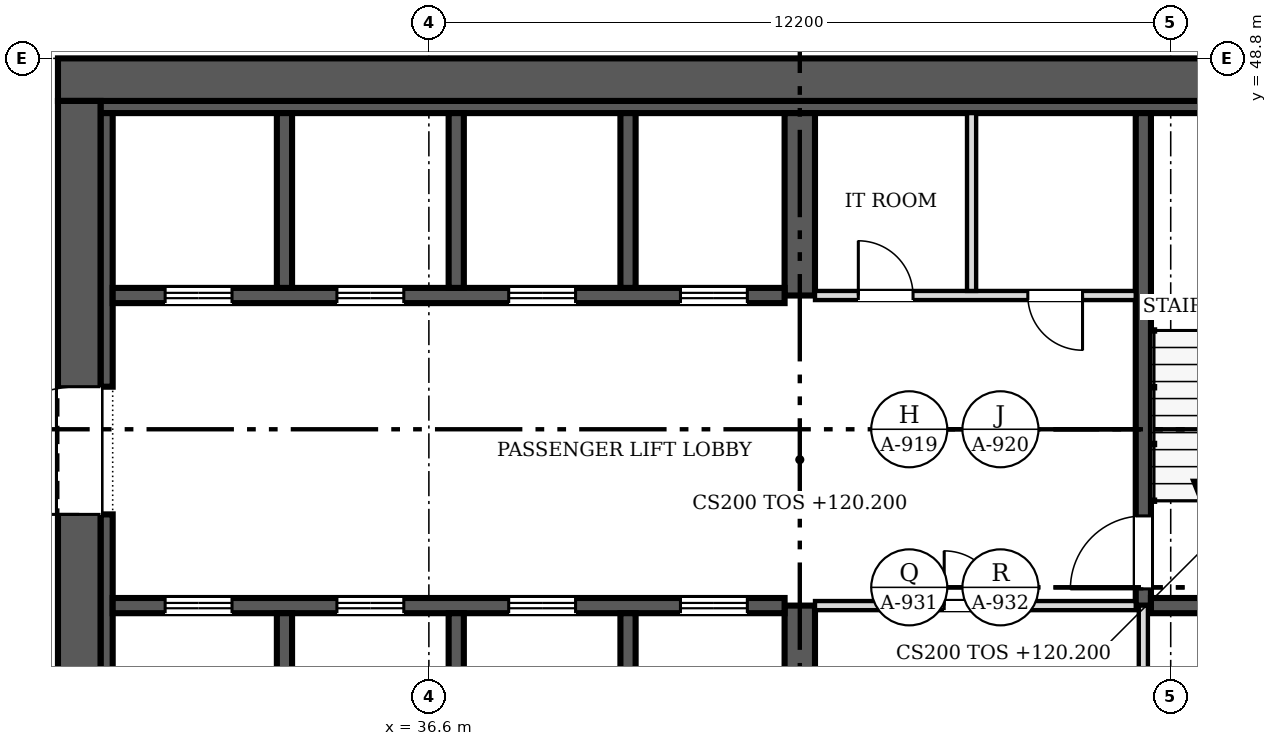
"""IFC4 building model, lengths in metres.
Left out: names, types, materials, properties, quantities, classifications, styles, units other than length and angle.
Written with IfcOpenShell. Run it as: python <this file> out.ifc"""

import sys

from ifc_helpers import new_model, si_unit, direction, frame, frame_2d, origin, place, context, subcontext, project, spatial, rectangle, extrude, source, transform, mapped, element, fill, save


model = new_model("IFC4")
c1 = context("Model", 3, precision=1e-05, world=origin(), true_north=direction((0.0, 1.0)))
c2 = subcontext(c1, "Body", "Model", "MODEL_VIEW")
j1 = project(units=[si_unit("LENGTHUNIT", "METRE"), si_unit("PLANEANGLEUNIT", "RADIAN")], contexts=[c1])
p1 = place(None, origin())
s1 = spatial("IfcSite", under=j1, at=p1, CompositionType="ELEMENT")
p2 = place(p1, origin())
s2 = spatial("IfcBuilding", under=s1, at=p2, CompositionType="ELEMENT")
p3 = place(p2, frame((0.0, 0.0, 120.2)))
s3 = spatial("IfcBuildingStorey", under=s2, at=p3, CompositionType="ELEMENT", Elevation=120.2)
p4 = place(p3, frame((30.85, 25.1, 0.0), z_axis=(0.0, 0.0, 1.0), x_axis=(0.0, 1.0, 0.0)))
e1 = element("IfcWall", 1, at=p4, inside=s3, PredefinedType="SHEAR", context=c2, shape_type="SweptSolid", body=[
    extrude(rectangle(XDim=23.0, YDim=0.7, at=frame_2d((11.5, 0.0))), origin(), (0.0, 0.0, 1.0), 3.8),
])
m1 = source(origin(), c2, "Body", "SweptSolid", [
    extrude(rectangle(XDim=2.1, YDim=2.4, at=frame_2d((1.05, 1.2))), frame((0.0, 0.36, 0.0), z_axis=(0.0, -1.0, 0.0), x_axis=(1.0, 0.0, 0.0)), (0.0, 0.0, 1.0), 0.72),
])
p5 = place(p4, frame((4.7, 0.0, 0.0)))
e2 = element("IfcOpeningElement", 2, at=p5, cuts=e1, PredefinedType="OPENING", context=c2, shape_type="MappedRepresentation", body=[
    mapped(m1, transform((0.0, 0.0, 0.0), scale=1.0)),
])
p6 = place(p4, frame((16.2, 0.0, 0.0)))
e3 = element("IfcOpeningElement", 3, at=p6, cuts=e1, PredefinedType="OPENING", context=c2, shape_type="MappedRepresentation", body=[
    mapped(m1, transform((0.0, 0.0, 0.0), scale=1.0)),
])
p7 = place(p3, frame((30.5, 48.45, 0.0), z_axis=(0.0, 0.0, 1.0), x_axis=(1.0, 0.0, 0.0)))
e4 = element("IfcWall", 4, at=p7, inside=s3, PredefinedType="SHEAR", context=c2, shape_type="SweptSolid", body=[
    extrude(rectangle(XDim=24.4, YDim=0.7, at=frame_2d((12.2, 0.0))), origin(), (0.0, 0.0, 1.0), 3.8),
])
p8 = place(p3, frame((31.2, 48.0, 0.0), z_axis=(0.0, 0.0, 1.0), x_axis=(1.0, 0.0, 0.0)))
e5 = element("IfcWall", 5, at=p8, inside=s3, PredefinedType="SOLIDWALL", context=c2, shape_type="SweptSolid", body=[
    extrude(rectangle(XDim=23.0, YDim=0.2, at=frame_2d((11.5, 0.0))), origin(), (0.0, 0.0, 1.0), 3.8),
])
p9 = place(p3, frame((31.3, 31.9, 0.0), z_axis=(0.0, 0.0, 1.0), x_axis=(0.0, 1.0, 0.0)))
e6 = element("IfcWall", 6, at=p9, inside=s3, PredefinedType="SOLIDWALL", context=c2, shape_type="SweptSolid", body=[
    extrude(rectangle(XDim=9.4, YDim=0.2, at=frame_2d((4.7, 0.0))), origin(), (0.0, 0.0, 1.0), 3.8),
])
p10 = place(p3, frame((31.3, 43.4, 0.0), z_axis=(0.0, 0.0, 1.0), x_axis=(0.0, 1.0, 0.0)))
e7 = element("IfcWall", 7, at=p10, inside=s3, PredefinedType="SOLIDWALL", context=c2, shape_type="SweptSolid", body=[
    extrude(rectangle(XDim=4.5, YDim=0.2, at=frame_2d((2.25, 0.0))), origin(), (0.0, 0.0, 1.0), 3.8),
])
p11 = place(p3, frame((42.7, 36.85, 0.0), z_axis=(0.0, 0.0, 1.0), x_axis=(0.0, 1.0, 0.0)))
e8 = element("IfcWall", 8, at=p11, inside=s3, PredefinedType="SHEAR", context=c2, shape_type="SweptSolid", body=[
    extrude(rectangle(XDim=2.95, YDim=0.5, at=frame_2d((1.475, 0.0))), origin(), (0.0, 0.0, 1.0), 3.8),
])
p12 = place(p3, frame((42.7, 44.9, 0.0), z_axis=(0.0, 0.0, 1.0), x_axis=(0.0, 1.0, 0.0)))
e9 = element("IfcWall", 9, at=p12, inside=s3, PredefinedType="SHEAR", context=c2, shape_type="SweptSolid", body=[
    extrude(rectangle(XDim=3.0, YDim=0.5, at=frame_2d((1.5, 0.0))), origin(), (0.0, 0.0, 1.0), 3.8),
])
p13 = place(p3, frame((31.4, 39.8, 0.0), z_axis=(0.0, 0.0, 1.0), x_axis=(1.0, 0.0, 0.0)))
e10 = element("IfcWall", 10, at=p13, inside=s3, PredefinedType="SOLIDWALL", context=c2, shape_type="SweptSolid", body=[
    extrude(rectangle(XDim=11.05, YDim=0.25, at=frame_2d((5.525, 0.0))), origin(), (0.0, 0.0, 1.0), 3.8),
])
m2 = source(origin(), c2, "Body", "SweptSolid", [
    extrude(rectangle(XDim=1.1, YDim=2.1, at=frame_2d((0.55, 1.05))), frame((0.0, 0.135, 0.0), z_axis=(0.0, -1.0, 0.0), x_axis=(1.0, 0.0, 0.0)), (0.0, 0.0, 1.0), 0.27),
])
p14 = place(p13, frame((0.863, 0.0, 0.0)))
e11 = element("IfcOpeningElement", 11, at=p14, cuts=e10, PredefinedType="OPENING", context=c2, shape_type="MappedRepresentation", body=[
    mapped(m2, transform((0.0, 0.0, 0.0), scale=1.0)),
])
p15 = place(p13, frame((3.688, 0.0, 0.0)))
e12 = element("IfcOpeningElement", 12, at=p15, cuts=e10, PredefinedType="OPENING", context=c2, shape_type="MappedRepresentation", body=[
    mapped(m2, transform((0.0, 0.0, 0.0), scale=1.0)),
])
p16 = place(p13, frame((6.512, 0.0, 0.0)))
e13 = element("IfcOpeningElement", 13, at=p16, cuts=e10, PredefinedType="OPENING", context=c2, shape_type="MappedRepresentation", body=[
    mapped(m2, transform((0.0, 0.0, 0.0), scale=1.0)),
])
p17 = place(p13, frame((9.337, 0.0, 0.0)))
e14 = element("IfcOpeningElement", 14, at=p17, cuts=e10, PredefinedType="OPENING", context=c2, shape_type="MappedRepresentation", body=[
    mapped(m2, transform((0.0, 0.0, 0.0), scale=1.0)),
])
p18 = place(p3, frame((42.45, 44.9, 0.0), z_axis=(0.0, 0.0, 1.0), x_axis=(-1.0, 0.0, 0.0)))
e15 = element("IfcWall", 15, at=p18, inside=s3, PredefinedType="SOLIDWALL", context=c2, shape_type="SweptSolid", body=[
    extrude(rectangle(XDim=11.05, YDim=0.25, at=frame_2d((5.525, 0.0))), origin(), (0.0, 0.0, 1.0), 3.8),
])
p19 = place(p18, frame((9.087, 0.0, 0.0)))
e16 = element("IfcOpeningElement", 16, at=p19, cuts=e15, PredefinedType="OPENING", context=c2, shape_type="MappedRepresentation", body=[
    mapped(m2, transform((0.0, 0.0, 0.0), scale=1.0)),
])
p20 = place(p18, frame((6.262, 0.0, 0.0)))
e17 = element("IfcOpeningElement", 17, at=p20, cuts=e15, PredefinedType="OPENING", context=c2, shape_type="MappedRepresentation", body=[
    mapped(m2, transform((0.0, 0.0, 0.0), scale=1.0)),
])
p21 = place(p18, frame((3.438, 0.0, 0.0)))
e18 = element("IfcOpeningElement", 18, at=p21, cuts=e15, PredefinedType="OPENING", context=c2, shape_type="MappedRepresentation", body=[
    mapped(m2, transform((0.0, 0.0, 0.0), scale=1.0)),
])
p22 = place(p18, frame((0.613, 0.0, 0.0)))
e19 = element("IfcOpeningElement", 19, at=p22, cuts=e15, PredefinedType="OPENING", context=c2, shape_type="MappedRepresentation", body=[
    mapped(m2, transform((0.0, 0.0, 0.0), scale=1.0)),
])
p23 = place(p3, frame((48.35, 47.9, 0.0), z_axis=(0.0, 0.0, 1.0), x_axis=(0.0, -1.0, 0.0)))
e20 = element("IfcWall", 20, at=p23, inside=s3, PredefinedType="SOLIDWALL", context=c2, shape_type="SweptSolid", body=[
    extrude(rectangle(XDim=8.1, YDim=0.25, at=frame_2d((4.05, 0.0))), origin(), (0.0, 0.0, 1.0), 3.8),
])
m3 = source(origin(), c2, "Body", "SweptSolid", [
    extrude(rectangle(XDim=1.2, YDim=2.1, at=frame_2d((0.6, 1.05))), frame((0.0, 0.135, 0.0), z_axis=(0.0, -1.0, 0.0), x_axis=(1.0, 0.0, 0.0)), (0.0, 0.0, 1.0), 0.27),
])
p24 = place(p23, frame((6.625, 0.0, 0.0)))
e21 = element("IfcOpeningElement", 21, at=p24, cuts=e20, PredefinedType="OPENING", context=c2, shape_type="MappedRepresentation", body=[
    mapped(m3, transform((0.0, 0.0, 0.0), scale=1.0)),
])
p25 = place(p3, frame((48.475, 39.8, 0.0), z_axis=(0.0, 0.0, 1.0), x_axis=(1.0, 0.0, 0.0)))
e22 = element("IfcWall", 22, at=p25, inside=s3, PredefinedType="SOLIDWALL", context=c2, shape_type="SweptSolid", body=[
    extrude(rectangle(XDim=3.4, YDim=0.25, at=frame_2d((1.7, 0.0))), origin(), (0.0, 0.0, 1.0), 3.8),
])
for number, where, z_axis, x_axis in (
    (23, (34.225, 36.85, 0.0), (0.0, 0.0, 1.0), (0.0, 1.0, 0.0)),
    (24, (37.05, 36.85, 0.0), (0.0, 0.0, 1.0), (0.0, 1.0, 0.0)),
    (25, (39.875, 36.85, 0.0), (0.0, 0.0, 1.0), (0.0, 1.0, 0.0)),
):
    element("IfcWall", number, at=place(p3, frame(where, z_axis=z_axis, x_axis=x_axis)), inside=s3, PredefinedType="SOLIDWALL", context=c2, shape_type="SweptSolid", body=[
        extrude(rectangle(XDim=2.825, YDim=0.25, at=frame_2d((1.413, 0.0))), origin(), (0.0, 0.0, 1.0), 3.8),
    ])
for number, where, z_axis, x_axis in (
    (26, (34.225, 45.025, 0.0), (0.0, 0.0, 1.0), (0.0, 1.0, 0.0)),
    (27, (37.05, 45.025, 0.0), (0.0, 0.0, 1.0), (0.0, 1.0, 0.0)),
    (28, (39.875, 45.025, 0.0), (0.0, 0.0, 1.0), (0.0, 1.0, 0.0)),
):
    element("IfcWall", number, at=place(p3, frame(where, z_axis=z_axis, x_axis=x_axis)), inside=s3, PredefinedType="SOLIDWALL", context=c2, shape_type="SweptSolid", body=[
        extrude(rectangle(XDim=2.875, YDim=0.25, at=frame_2d((1.438, 0.0))), origin(), (0.0, 0.0, 1.0), 3.8),
    ])
p26 = place(p3, frame((48.225, 39.8, 0.0), z_axis=(0.0, 0.0, 1.0), x_axis=(-1.0, 0.0, 0.0)))
e29 = element("IfcWall", 29, at=p26, inside=s3, PredefinedType="PARTITIONING", context=c2, shape_type="SweptSolid", body=[
    extrude(rectangle(XDim=5.275, YDim=0.15, at=frame_2d((2.638, 0.0))), origin(), (0.0, 0.0, 1.0), 3.6),
])
m4 = source(origin(), c2, "Body", "SweptSolid", [
    extrude(rectangle(XDim=0.9, YDim=2.1, at=frame_2d((0.45, 1.05))), frame((0.0, 0.085, 0.0), z_axis=(0.0, -1.0, 0.0), x_axis=(1.0, 0.0, 0.0)), (0.0, 0.0, 1.0), 0.17),
])
p27 = place(p26, frame((2.25, 0.0, 0.0)))
e30 = element("IfcOpeningElement", 30, at=p27, cuts=e29, PredefinedType="OPENING", context=c2, shape_type="MappedRepresentation", body=[
    mapped(m4, transform((0.0, 0.0, 0.0), scale=1.0)),
])
p28 = place(p3, frame((42.95, 44.9, 0.0), z_axis=(0.0, 0.0, 1.0), x_axis=(1.0, 0.0, 0.0)))
e31 = element("IfcWall", 31, at=p28, inside=s3, PredefinedType="PARTITIONING", context=c2, shape_type="SweptSolid", body=[
    extrude(rectangle(XDim=5.275, YDim=0.15, at=frame_2d((2.638, 0.0))), origin(), (0.0, 0.0, 1.0), 3.6),
])
p29 = place(p28, frame((0.712, 0.0, 0.0)))
e32 = element("IfcOpeningElement", 32, at=p29, cuts=e31, PredefinedType="OPENING", context=c2, shape_type="MappedRepresentation", body=[
    mapped(m4, transform((0.0, 0.0, 0.0), scale=1.0)),
])
p30 = place(p28, frame((3.5, 0.0, 0.0)))
e33 = element("IfcOpeningElement", 33, at=p30, cuts=e31, PredefinedType="OPENING", context=c2, shape_type="MappedRepresentation", body=[
    mapped(m4, transform((0.0, 0.0, 0.0), scale=1.0)),
])
p31 = place(p3, frame((48.35, 36.85, 0.0), z_axis=(0.0, 0.0, 1.0), x_axis=(0.0, 1.0, 0.0)))
e34 = element("IfcWall", 34, at=p31, inside=s3, PredefinedType="PARTITIONING", context=c2, shape_type="SweptSolid", body=[
    extrude(rectangle(XDim=2.95, YDim=0.15, at=frame_2d((1.475, 0.0))), origin(), (0.0, 0.0, 1.0), 3.6),
])
p32 = place(p3, frame((45.525, 44.975, 0.0), z_axis=(0.0, 0.0, 1.0), x_axis=(0.0, 1.0, 0.0)))
e35 = element("IfcWall", 35, at=p32, inside=s3, PredefinedType="PARTITIONING", context=c2, shape_type="SweptSolid", body=[
    extrude(rectangle(XDim=2.925, YDim=0.15, at=frame_2d((1.462, 0.0))), origin(), (0.0, 0.0, 1.0), 3.6),
])
m5 = source(origin(), c2, "Body", "SweptSolid", [
    extrude(rectangle(XDim=2.1, YDim=2.4, at=frame_2d((1.05, 1.2))), frame((0.0, 0.025, 0.0), z_axis=(0.0, -1.0, 0.0), x_axis=(1.0, 0.0, 0.0)), (0.0, 0.0, 1.0), 0.05),
])
p33 = place(p6, origin())
e36 = element("IfcDoor", 36, at=p33, inside=s3, OperationType="DOUBLE_DOOR_SINGLE_SWING", PredefinedType="DOOR", context=c2, shape_type="MappedRepresentation", body=[
    mapped(m5, transform((0.0, 0.0, 0.0), scale=1.0)),
])
fill(e3, e36)
m6 = source(origin(), c2, "Body", "SweptSolid", [
    extrude(rectangle(XDim=1.1, YDim=2.1, at=frame_2d((0.55, 1.05))), frame((0.0, 0.025, 0.0), z_axis=(0.0, -1.0, 0.0), x_axis=(1.0, 0.0, 0.0)), (0.0, 0.0, 1.0), 0.05),
])
p34 = place(p14, origin())
e37 = element("IfcDoor", 37, at=p34, inside=s3, OperationType="DOUBLE_DOOR_SLIDING", PredefinedType="DOOR", context=c2, shape_type="MappedRepresentation", body=[
    mapped(m6, transform((0.0, 0.0, 0.0), scale=1.0)),
])
fill(e11, e37)
p35 = place(p15, origin())
e38 = element("IfcDoor", 38, at=p35, inside=s3, OperationType="DOUBLE_DOOR_SLIDING", PredefinedType="DOOR", context=c2, shape_type="MappedRepresentation", body=[
    mapped(m6, transform((0.0, 0.0, 0.0), scale=1.0)),
])
fill(e12, e38)
p36 = place(p16, origin())
e39 = element("IfcDoor", 39, at=p36, inside=s3, OperationType="DOUBLE_DOOR_SLIDING", PredefinedType="DOOR", context=c2, shape_type="MappedRepresentation", body=[
    mapped(m6, transform((0.0, 0.0, 0.0), scale=1.0)),
])
fill(e13, e39)
p37 = place(p17, origin())
e40 = element("IfcDoor", 40, at=p37, inside=s3, OperationType="DOUBLE_DOOR_SLIDING", PredefinedType="DOOR", context=c2, shape_type="MappedRepresentation", body=[
    mapped(m6, transform((0.0, 0.0, 0.0), scale=1.0)),
])
fill(e14, e40)
p38 = place(p19, origin())
e41 = element("IfcDoor", 41, at=p38, inside=s3, OperationType="DOUBLE_DOOR_SLIDING", PredefinedType="DOOR", context=c2, shape_type="MappedRepresentation", body=[
    mapped(m6, transform((0.0, 0.0, 0.0), scale=1.0)),
])
fill(e16, e41)
p39 = place(p20, origin())
e42 = element("IfcDoor", 42, at=p39, inside=s3, OperationType="DOUBLE_DOOR_SLIDING", PredefinedType="DOOR", context=c2, shape_type="MappedRepresentation", body=[
    mapped(m6, transform((0.0, 0.0, 0.0), scale=1.0)),
])
fill(e17, e42)
p40 = place(p21, origin())
e43 = element("IfcDoor", 43, at=p40, inside=s3, OperationType="DOUBLE_DOOR_SLIDING", PredefinedType="DOOR", context=c2, shape_type="MappedRepresentation", body=[
    mapped(m6, transform((0.0, 0.0, 0.0), scale=1.0)),
])
fill(e18, e43)
p41 = place(p22, origin())
e44 = element("IfcDoor", 44, at=p41, inside=s3, OperationType="DOUBLE_DOOR_SLIDING", PredefinedType="DOOR", context=c2, shape_type="MappedRepresentation", body=[
    mapped(m6, transform((0.0, 0.0, 0.0), scale=1.0)),
])
fill(e19, e44)
m7 = source(origin(), c2, "Body", "SweptSolid", [
    extrude(rectangle(XDim=1.2, YDim=2.1, at=frame_2d((0.6, 1.05))), frame((0.0, 0.025, 0.0), z_axis=(0.0, -1.0, 0.0), x_axis=(1.0, 0.0, 0.0)), (0.0, 0.0, 1.0), 0.05),
])
p42 = place(p24, origin())
e45 = element("IfcDoor", 45, at=p42, inside=s3, OperationType="SINGLE_SWING_RIGHT", PredefinedType="DOOR", context=c2, shape_type="MappedRepresentation", body=[
    mapped(m7, transform((0.0, 0.0, 0.0), scale=1.0)),
])
fill(e21, e45)
m8 = source(origin(), c2, "Body", "SweptSolid", [
    extrude(rectangle(XDim=0.9, YDim=2.1, at=frame_2d((0.45, 1.05))), frame((0.0, 0.025, 0.0), z_axis=(0.0, -1.0, 0.0), x_axis=(1.0, 0.0, 0.0)), (0.0, 0.0, 1.0), 0.05),
])
p43 = place(p27, origin())
e46 = element("IfcDoor", 46, at=p43, inside=s3, OperationType="SINGLE_SWING_RIGHT", PredefinedType="DOOR", context=c2, shape_type="MappedRepresentation", body=[
    mapped(m8, transform((0.0, 0.0, 0.0), scale=1.0)),
])
fill(e30, e46)
p44 = place(p29, origin())
e47 = element("IfcDoor", 47, at=p44, inside=s3, OperationType="SINGLE_SWING_LEFT", PredefinedType="DOOR", context=c2, shape_type="MappedRepresentation", body=[
    mapped(m8, transform((0.0, 0.0, 0.0), scale=1.0)),
])
fill(e32, e47)
p45 = place(p30, origin())
e48 = element("IfcDoor", 48, at=p45, inside=s3, OperationType="SINGLE_SWING_RIGHT", PredefinedType="DOOR", context=c2, shape_type="MappedRepresentation", body=[
    mapped(m8, transform((0.0, 0.0, 0.0), scale=1.0)),
])
fill(e33, e48)
save(model, sys.argv[1])
